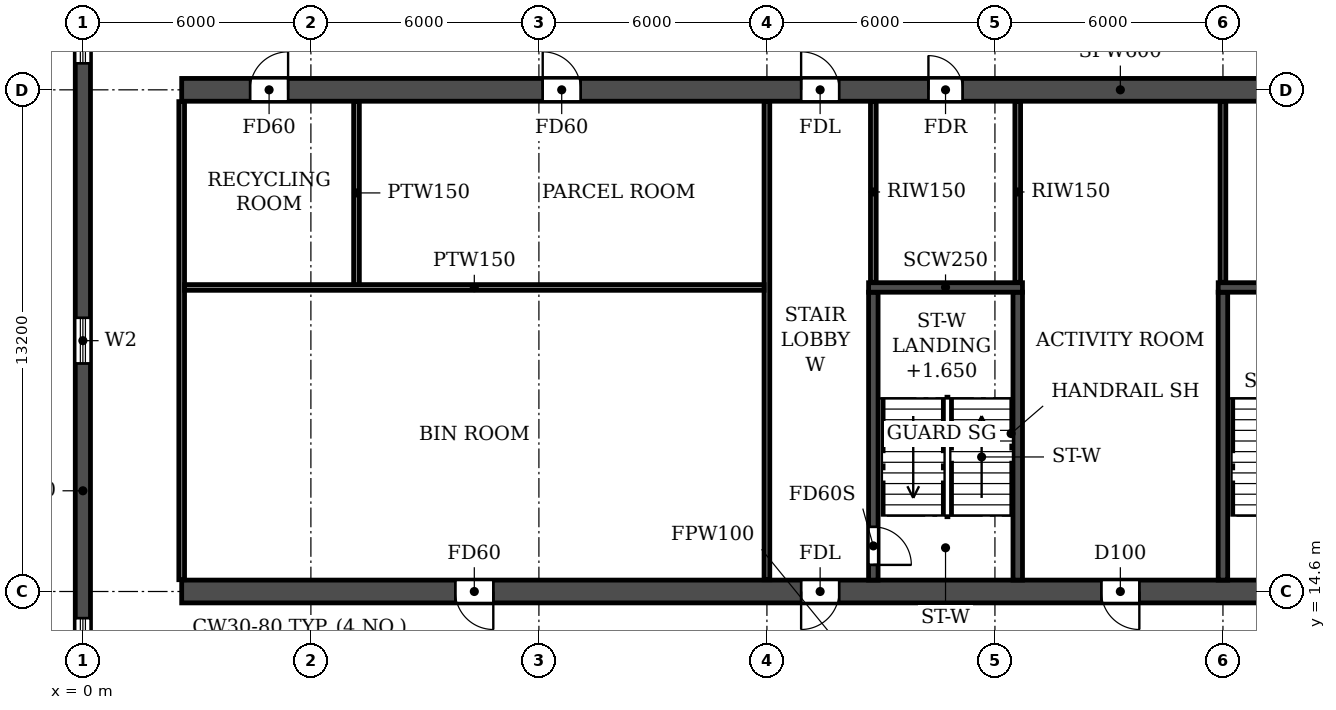
"""IFC4 building model, lengths in metres.
Left out: names, types, materials, properties, quantities, classifications, styles, units other than length and angle.
Written with IfcOpenShell. Run it as: python <this file> out.ifc"""

import sys

from ifc_helpers import new_model, si_unit, direction, frame, frame_2d, origin, place, context, subcontext, project, spatial, rectangle, extrude, element, fill, save


model = new_model("IFC4")
c1 = context("Model", 3, precision=1e-05, world=origin(), true_north=direction((0.0, 1.0)))
c2 = subcontext(c1, "Body", "Model", "MODEL_VIEW")
j1 = project(units=[si_unit("LENGTHUNIT", "METRE"), si_unit("PLANEANGLEUNIT", "RADIAN")], contexts=[c1])
p1 = place(None, origin())
s1 = spatial("IfcSite", under=j1, at=p1, CompositionType="ELEMENT")
p2 = place(p1, origin())
s2 = spatial("IfcBuilding", under=s1, at=p2, CompositionType="ELEMENT")
p3 = place(p2, frame((0.0, 0.0, 26.7)))
s3 = spatial("IfcBuildingStorey", under=s2, at=p3, CompositionType="ELEMENT", Elevation=26.7)
p4 = place(p3, frame((0.0, 4.683, 0.0), z_axis=(0.0, 0.0, 1.0), x_axis=(0.0, 1.0, 0.0)))
e1 = element("IfcWall", 1, at=p4, inside=s3, PredefinedType="SHEAR", context=c2, shape_type="SweptSolid", body=[
    extrude(rectangle(XDim=35.434, YDim=0.4, at=frame_2d((17.717, 0.0))), origin(), (0.0, 0.0, 1.0), 3.05),
])
p5 = place(p4, frame((23.817, 0.0, 0.9)))
e2 = element("IfcOpeningElement", 2, at=p5, cuts=e1, PredefinedType="OPENING", context=c2, shape_type="SweptSolid", body=[
    extrude(rectangle(XDim=1.2, YDim=1.5, at=frame_2d((0.6, 0.75))), frame((0.0, 0.21, 0.0), z_axis=(0.0, -1.0, 0.0), x_axis=(1.0, 0.0, 0.0)), (0.0, 0.0, 1.0), 0.42),
])
p6 = place(p4, frame((8.017, 0.0, 0.9)))
e3 = element("IfcOpeningElement", 3, at=p6, cuts=e1, PredefinedType="OPENING", context=c2, shape_type="SweptSolid", body=[
    extrude(rectangle(XDim=1.2, YDim=1.5, at=frame_2d((0.6, 0.75))), frame((0.0, 0.21, 0.0), z_axis=(0.0, -1.0, 0.0), x_axis=(1.0, 0.0, 0.0)), (0.0, 0.0, 1.0), 0.42),
])
p7 = place(p4, frame((15.917, 0.0, 0.9)))
e4 = element("IfcOpeningElement", 4, at=p7, cuts=e1, PredefinedType="OPENING", context=c2, shape_type="SweptSolid", body=[
    extrude(rectangle(XDim=1.2, YDim=1.5, at=frame_2d((0.6, 0.75))), frame((0.0, 0.21, 0.0), z_axis=(0.0, -1.0, 0.0), x_axis=(1.0, 0.0, 0.0)), (0.0, 0.0, 1.0), 0.42),
])
p8 = place(p4, frame((29.493, 0.0, 0.6)))
e5 = element("IfcOpeningElement", 5, at=p8, cuts=e1, PredefinedType="OPENING", context=c2, shape_type="SweptSolid", body=[
    extrude(rectangle(XDim=2.2, YDim=1.8, at=frame_2d((1.1, 0.9))), frame((0.0, 0.21, 0.0), z_axis=(0.0, -1.0, 0.0), x_axis=(1.0, 0.0, 0.0)), (0.0, 0.0, 1.0), 0.42),
])
p9 = place(p4, frame((2.541, 0.0, 0.6)))
e6 = element("IfcOpeningElement", 6, at=p9, cuts=e1, PredefinedType="OPENING", context=c2, shape_type="SweptSolid", body=[
    extrude(rectangle(XDim=2.2, YDim=1.8, at=frame_2d((1.1, 0.9))), frame((0.0, 0.21, 0.0), z_axis=(0.0, -1.0, 0.0), x_axis=(1.0, 0.0, 0.0)), (0.0, 0.0, 1.0), 0.42),
])
p10 = place(p3, frame((2.6, 14.6, 0.0), z_axis=(0.0, 0.0, 1.0), x_axis=(1.0, 0.0, 0.0)))
e7 = element("IfcWall", 7, at=p10, inside=s3, PredefinedType="SOLIDWALL", context=c2, shape_type="SweptSolid", body=[
    extrude(rectangle(XDim=96.8, YDim=0.6, at=frame_2d((48.4, 0.0))), origin(), (0.0, 0.0, 1.0), 3.05),
])
p11 = place(p10, frame((7.2, 0.0, 0.0)))
e8 = element("IfcOpeningElement", 8, at=p11, cuts=e7, PredefinedType="OPENING", context=c2, shape_type="SweptSolid", body=[
    extrude(rectangle(XDim=1.0, YDim=2.1, at=frame_2d((0.5, 1.05))), frame((0.0, 0.31, 0.0), z_axis=(0.0, -1.0, 0.0), x_axis=(1.0, 0.0, 0.0)), (0.0, 0.0, 1.0), 0.62),
])
p12 = place(p10, frame((16.3, 0.0, 0.0)))
e9 = element("IfcOpeningElement", 9, at=p12, cuts=e7, PredefinedType="OPENING", context=c2, shape_type="SweptSolid", body=[
    extrude(rectangle(XDim=1.0, YDim=2.1, at=frame_2d((0.5, 1.05))), frame((0.0, 0.31, 0.0), z_axis=(0.0, -1.0, 0.0), x_axis=(1.0, 0.0, 0.0)), (0.0, 0.0, 1.0), 0.62),
])
p13 = place(p10, frame((24.2, 0.0, 0.0)))
e10 = element("IfcOpeningElement", 10, at=p13, cuts=e7, PredefinedType="OPENING", context=c2, shape_type="SweptSolid", body=[
    extrude(rectangle(XDim=1.0, YDim=2.1, at=frame_2d((0.5, 1.05))), frame((0.0, 0.31, 0.0), z_axis=(0.0, -1.0, 0.0), x_axis=(1.0, 0.0, 0.0)), (0.0, 0.0, 1.0), 0.62),
])
p14 = place(p10, frame((28.8, 0.0, 0.0)))
e11 = element("IfcOpeningElement", 11, at=p14, cuts=e7, PredefinedType="OPENING", context=c2, shape_type="SweptSolid", body=[
    extrude(rectangle(XDim=1.0, YDim=2.1, at=frame_2d((0.5, 1.05))), frame((0.0, 0.31, 0.0), z_axis=(0.0, -1.0, 0.0), x_axis=(1.0, 0.0, 0.0)), (0.0, 0.0, 1.0), 0.62),
])
p15 = place(p10, frame((40.1, 0.0, 0.0)))
e12 = element("IfcOpeningElement", 12, at=p15, cuts=e7, PredefinedType="OPENING", context=c2, shape_type="SweptSolid", body=[
    extrude(rectangle(XDim=1.0, YDim=2.1, at=frame_2d((0.5, 1.05))), frame((0.0, 0.31, 0.0), z_axis=(0.0, -1.0, 0.0), x_axis=(1.0, 0.0, 0.0)), (0.0, 0.0, 1.0), 0.62),
])
p16 = place(p10, frame((44.0, 0.0, 0.0)))
e13 = element("IfcOpeningElement", 13, at=p16, cuts=e7, PredefinedType="OPENING", context=c2, shape_type="SweptSolid", body=[
    extrude(rectangle(XDim=1.0, YDim=2.1, at=frame_2d((0.5, 1.05))), frame((0.0, 0.31, 0.0), z_axis=(0.0, -1.0, 0.0), x_axis=(1.0, 0.0, 0.0)), (0.0, 0.0, 1.0), 0.62),
])
p17 = place(p10, frame((47.9, 0.0, 0.0)))
e14 = element("IfcOpeningElement", 14, at=p17, cuts=e7, PredefinedType="OPENING", context=c2, shape_type="SweptSolid", body=[
    extrude(rectangle(XDim=1.0, YDim=2.1, at=frame_2d((0.5, 1.05))), frame((0.0, 0.31, 0.0), z_axis=(0.0, -1.0, 0.0), x_axis=(1.0, 0.0, 0.0)), (0.0, 0.0, 1.0), 0.62),
])
p18 = place(p10, frame((53.1, 0.0, 0.0)))
e15 = element("IfcOpeningElement", 15, at=p18, cuts=e7, PredefinedType="OPENING", context=c2, shape_type="SweptSolid", body=[
    extrude(rectangle(XDim=1.0, YDim=2.1, at=frame_2d((0.5, 1.05))), frame((0.0, 0.31, 0.0), z_axis=(0.0, -1.0, 0.0), x_axis=(1.0, 0.0, 0.0)), (0.0, 0.0, 1.0), 0.62),
])
p19 = place(p10, frame((67.0, 0.0, 0.0)))
e16 = element("IfcOpeningElement", 16, at=p19, cuts=e7, PredefinedType="OPENING", context=c2, shape_type="SweptSolid", body=[
    extrude(rectangle(XDim=1.0, YDim=2.1, at=frame_2d((0.5, 1.05))), frame((0.0, 0.31, 0.0), z_axis=(0.0, -1.0, 0.0), x_axis=(1.0, 0.0, 0.0)), (0.0, 0.0, 1.0), 0.62),
])
p20 = place(p10, frame((71.6, 0.0, 0.0)))
e17 = element("IfcOpeningElement", 17, at=p20, cuts=e7, PredefinedType="OPENING", context=c2, shape_type="SweptSolid", body=[
    extrude(rectangle(XDim=1.0, YDim=2.1, at=frame_2d((0.5, 1.05))), frame((0.0, 0.31, 0.0), z_axis=(0.0, -1.0, 0.0), x_axis=(1.0, 0.0, 0.0)), (0.0, 0.0, 1.0), 0.62),
])
p21 = place(p10, frame((79.5, 0.0, 0.0)))
e18 = element("IfcOpeningElement", 18, at=p21, cuts=e7, PredefinedType="OPENING", context=c2, shape_type="SweptSolid", body=[
    extrude(rectangle(XDim=1.0, YDim=2.1, at=frame_2d((0.5, 1.05))), frame((0.0, 0.31, 0.0), z_axis=(0.0, -1.0, 0.0), x_axis=(1.0, 0.0, 0.0)), (0.0, 0.0, 1.0), 0.62),
])
p22 = place(p10, frame((83.15, 0.0, 0.0)))
e19 = element("IfcOpeningElement", 19, at=p22, cuts=e7, PredefinedType="OPENING", context=c2, shape_type="SweptSolid", body=[
    extrude(rectangle(XDim=1.0, YDim=2.1, at=frame_2d((0.5, 1.05))), frame((0.0, 0.31, 0.0), z_axis=(0.0, -1.0, 0.0), x_axis=(1.0, 0.0, 0.0)), (0.0, 0.0, 1.0), 0.62),
])
p23 = place(p10, frame((90.85, 0.0, 0.0)))
e20 = element("IfcOpeningElement", 20, at=p23, cuts=e7, PredefinedType="OPENING", context=c2, shape_type="SweptSolid", body=[
    extrude(rectangle(XDim=1.0, YDim=2.1, at=frame_2d((0.5, 1.05))), frame((0.0, 0.31, 0.0), z_axis=(0.0, -1.0, 0.0), x_axis=(1.0, 0.0, 0.0)), (0.0, 0.0, 1.0), 0.62),
])
p24 = place(p3, frame((2.6, 27.8, 0.0), z_axis=(0.0, 0.0, 1.0), x_axis=(1.0, 0.0, 0.0)))
e21 = element("IfcWall", 21, at=p24, inside=s3, PredefinedType="SOLIDWALL", context=c2, shape_type="SweptSolid", body=[
    extrude(rectangle(XDim=96.8, YDim=0.6, at=frame_2d((48.4, 0.0))), origin(), (0.0, 0.0, 1.0), 3.05),
])
p25 = place(p24, frame((1.8, 0.0, 0.0)))
e22 = element("IfcOpeningElement", 22, at=p25, cuts=e21, PredefinedType="OPENING", context=c2, shape_type="SweptSolid", body=[
    extrude(rectangle(XDim=1.0, YDim=2.1, at=frame_2d((0.5, 1.05))), frame((0.0, 0.31, 0.0), z_axis=(0.0, -1.0, 0.0), x_axis=(1.0, 0.0, 0.0)), (0.0, 0.0, 1.0), 0.62),
])
p26 = place(p24, frame((9.5, 0.0, 0.0)))
e23 = element("IfcOpeningElement", 23, at=p26, cuts=e21, PredefinedType="OPENING", context=c2, shape_type="SweptSolid", body=[
    extrude(rectangle(XDim=1.0, YDim=2.1, at=frame_2d((0.5, 1.05))), frame((0.0, 0.31, 0.0), z_axis=(0.0, -1.0, 0.0), x_axis=(1.0, 0.0, 0.0)), (0.0, 0.0, 1.0), 0.62),
])
p27 = place(p24, frame((16.3, 0.0, 0.0)))
e24 = element("IfcOpeningElement", 24, at=p27, cuts=e21, PredefinedType="OPENING", context=c2, shape_type="SweptSolid", body=[
    extrude(rectangle(XDim=1.0, YDim=2.1, at=frame_2d((0.5, 1.05))), frame((0.0, 0.31, 0.0), z_axis=(0.0, -1.0, 0.0), x_axis=(1.0, 0.0, 0.0)), (0.0, 0.0, 1.0), 0.62),
])
p28 = place(p24, frame((19.65, 0.0, 0.0)))
e25 = element("IfcOpeningElement", 25, at=p28, cuts=e21, PredefinedType="OPENING", context=c2, shape_type="SweptSolid", body=[
    extrude(rectangle(XDim=0.9, YDim=2.1, at=frame_2d((0.45, 1.05))), frame((0.0, 0.31, 0.0), z_axis=(0.0, -1.0, 0.0), x_axis=(1.0, 0.0, 0.0)), (0.0, 0.0, 1.0), 0.62),
])
p29 = place(p24, frame((28.85, 0.0, 0.0)))
e26 = element("IfcOpeningElement", 26, at=p29, cuts=e21, PredefinedType="OPENING", context=c2, shape_type="SweptSolid", body=[
    extrude(rectangle(XDim=0.9, YDim=2.1, at=frame_2d((0.45, 1.05))), frame((0.0, 0.31, 0.0), z_axis=(0.0, -1.0, 0.0), x_axis=(1.0, 0.0, 0.0)), (0.0, 0.0, 1.0), 0.62),
])
p30 = place(p24, frame((32.0, 0.0, 0.0)))
e27 = element("IfcOpeningElement", 27, at=p30, cuts=e21, PredefinedType="OPENING", context=c2, shape_type="SweptSolid", body=[
    extrude(rectangle(XDim=1.0, YDim=2.1, at=frame_2d((0.5, 1.05))), frame((0.0, 0.31, 0.0), z_axis=(0.0, -1.0, 0.0), x_axis=(1.0, 0.0, 0.0)), (0.0, 0.0, 1.0), 0.62),
])
p31 = place(p24, frame((37.2, 0.0, 0.0)))
e28 = element("IfcOpeningElement", 28, at=p31, cuts=e21, PredefinedType="OPENING", context=c2, shape_type="SweptSolid", body=[
    extrude(rectangle(XDim=1.0, YDim=2.1, at=frame_2d((0.5, 1.05))), frame((0.0, 0.31, 0.0), z_axis=(0.0, -1.0, 0.0), x_axis=(1.0, 0.0, 0.0)), (0.0, 0.0, 1.0), 0.62),
])
p32 = place(p24, frame((45.0, 0.0, 0.0)))
e29 = element("IfcOpeningElement", 29, at=p32, cuts=e21, PredefinedType="OPENING", context=c2, shape_type="SweptSolid", body=[
    extrude(rectangle(XDim=1.0, YDim=2.1, at=frame_2d((0.5, 1.05))), frame((0.0, 0.31, 0.0), z_axis=(0.0, -1.0, 0.0), x_axis=(1.0, 0.0, 0.0)), (0.0, 0.0, 1.0), 0.62),
])
p33 = place(p24, frame((47.9, 0.0, 0.0)))
e30 = element("IfcOpeningElement", 30, at=p33, cuts=e21, PredefinedType="OPENING", context=c2, shape_type="SweptSolid", body=[
    extrude(rectangle(XDim=1.0, YDim=2.1, at=frame_2d((0.5, 1.05))), frame((0.0, 0.31, 0.0), z_axis=(0.0, -1.0, 0.0), x_axis=(1.0, 0.0, 0.0)), (0.0, 0.0, 1.0), 0.62),
])
p34 = place(p24, frame((52.1, 0.0, 0.0)))
e31 = element("IfcOpeningElement", 31, at=p34, cuts=e21, PredefinedType="OPENING", context=c2, shape_type="SweptSolid", body=[
    extrude(rectangle(XDim=1.0, YDim=2.1, at=frame_2d((0.5, 1.05))), frame((0.0, 0.31, 0.0), z_axis=(0.0, -1.0, 0.0), x_axis=(1.0, 0.0, 0.0)), (0.0, 0.0, 1.0), 0.62),
])
p35 = place(p24, frame((56.0, 0.0, 0.0)))
e32 = element("IfcOpeningElement", 32, at=p35, cuts=e21, PredefinedType="OPENING", context=c2, shape_type="SweptSolid", body=[
    extrude(rectangle(XDim=1.0, YDim=2.1, at=frame_2d((0.5, 1.05))), frame((0.0, 0.31, 0.0), z_axis=(0.0, -1.0, 0.0), x_axis=(1.0, 0.0, 0.0)), (0.0, 0.0, 1.0), 0.62),
])
p36 = place(p24, frame((58.6, 0.0, 0.0)))
e33 = element("IfcOpeningElement", 33, at=p36, cuts=e21, PredefinedType="OPENING", context=c2, shape_type="SweptSolid", body=[
    extrude(rectangle(XDim=1.0, YDim=2.1, at=frame_2d((0.5, 1.05))), frame((0.0, 0.31, 0.0), z_axis=(0.0, -1.0, 0.0), x_axis=(1.0, 0.0, 0.0)), (0.0, 0.0, 1.0), 0.62),
])
p37 = place(p24, frame((62.25, 0.0, 0.0)))
e34 = element("IfcOpeningElement", 34, at=p37, cuts=e21, PredefinedType="OPENING", context=c2, shape_type="SweptSolid", body=[
    extrude(rectangle(XDim=1.5, YDim=2.1, at=frame_2d((0.75, 1.05))), frame((0.0, 0.31, 0.0), z_axis=(0.0, -1.0, 0.0), x_axis=(1.0, 0.0, 0.0)), (0.0, 0.0, 1.0), 0.62),
])
p38 = place(p24, frame((67.05, 0.0, 0.0)))
e35 = element("IfcOpeningElement", 35, at=p38, cuts=e21, PredefinedType="OPENING", context=c2, shape_type="SweptSolid", body=[
    extrude(rectangle(XDim=0.9, YDim=2.1, at=frame_2d((0.45, 1.05))), frame((0.0, 0.31, 0.0), z_axis=(0.0, -1.0, 0.0), x_axis=(1.0, 0.0, 0.0)), (0.0, 0.0, 1.0), 0.62),
])
p39 = place(p24, frame((76.25, 0.0, 0.0)))
e36 = element("IfcOpeningElement", 36, at=p39, cuts=e21, PredefinedType="OPENING", context=c2, shape_type="SweptSolid", body=[
    extrude(rectangle(XDim=0.9, YDim=2.1, at=frame_2d((0.45, 1.05))), frame((0.0, 0.31, 0.0), z_axis=(0.0, -1.0, 0.0), x_axis=(1.0, 0.0, 0.0)), (0.0, 0.0, 1.0), 0.62),
])
p40 = place(p24, frame((79.5, 0.0, 0.0)))
e37 = element("IfcOpeningElement", 37, at=p40, cuts=e21, PredefinedType="OPENING", context=c2, shape_type="SweptSolid", body=[
    extrude(rectangle(XDim=1.0, YDim=2.1, at=frame_2d((0.5, 1.05))), frame((0.0, 0.31, 0.0), z_axis=(0.0, -1.0, 0.0), x_axis=(1.0, 0.0, 0.0)), (0.0, 0.0, 1.0), 0.62),
])
p41 = place(p24, frame((88.6, 0.0, 0.0)))
e38 = element("IfcOpeningElement", 38, at=p41, cuts=e21, PredefinedType="OPENING", context=c2, shape_type="SweptSolid", body=[
    extrude(rectangle(XDim=1.0, YDim=2.1, at=frame_2d((0.5, 1.05))), frame((0.0, 0.31, 0.0), z_axis=(0.0, -1.0, 0.0), x_axis=(1.0, 0.0, 0.0)), (0.0, 0.0, 1.0), 0.62),
])
p42 = place(p3, frame((30.0, 14.9, 0.0), z_axis=(0.0, 0.0, 1.0), x_axis=(0.0, 1.0, 0.0)))
e39 = element("IfcWall", 39, at=p42, inside=s3, PredefinedType="SOLIDWALL", context=c2, shape_type="SweptSolid", body=[
    extrude(rectangle(XDim=7.575, YDim=0.25, at=frame_2d((3.788, 0.0))), origin(), (0.0, 0.0, 1.0), 3.05),
])
p43 = place(p3, frame((29.875, 22.6, 0.0), z_axis=(0.0, 0.0, 1.0), x_axis=(1.0, 0.0, 0.0)))
e40 = element("IfcWall", 40, at=p43, inside=s3, PredefinedType="SOLIDWALL", context=c2, shape_type="SweptSolid", body=[
    extrude(rectangle(XDim=4.05, YDim=0.25, at=frame_2d((2.025, 0.0))), origin(), (0.0, 0.0, 1.0), 3.05),
])
p44 = place(p3, frame((20.8, 14.9, 0.0), z_axis=(0.0, 0.0, 1.0), x_axis=(0.0, 1.0, 0.0)))
e41 = element("IfcWall", 41, at=p44, inside=s3, PredefinedType="SOLIDWALL", context=c2, shape_type="SweptSolid", body=[
    extrude(rectangle(XDim=7.575, YDim=0.25, at=frame_2d((3.788, 0.0))), origin(), (0.0, 0.0, 1.0), 3.05),
])
p45 = place(p44, frame((0.4, 0.0, 0.0)))
e42 = element("IfcOpeningElement", 42, at=p45, cuts=e41, PredefinedType="OPENING", context=c2, shape_type="SweptSolid", body=[
    extrude(rectangle(XDim=1.0, YDim=2.1, at=frame_2d((0.5, 1.05))), frame((0.0, 0.135, 0.0), z_axis=(0.0, -1.0, 0.0), x_axis=(1.0, 0.0, 0.0)), (0.0, 0.0, 1.0), 0.27),
])
p46 = place(p3, frame((24.6, 14.9, 0.0), z_axis=(0.0, 0.0, 1.0), x_axis=(0.0, 1.0, 0.0)))
e43 = element("IfcWall", 43, at=p46, inside=s3, PredefinedType="SOLIDWALL", context=c2, shape_type="SweptSolid", body=[
    extrude(rectangle(XDim=7.575, YDim=0.25, at=frame_2d((3.788, 0.0))), origin(), (0.0, 0.0, 1.0), 3.05),
])
p47 = place(p3, frame((20.675, 22.6, 0.0), z_axis=(0.0, 0.0, 1.0), x_axis=(1.0, 0.0, 0.0)))
e44 = element("IfcWall", 44, at=p47, inside=s3, PredefinedType="SOLIDWALL", context=c2, shape_type="SweptSolid", body=[
    extrude(rectangle(XDim=4.05, YDim=0.25, at=frame_2d((2.025, 0.0))), origin(), (0.0, 0.0, 1.0), 3.05),
])
for number, where, z_axis, x_axis in (
    (45, (2.6, 14.91, 0.0), (0.0, 0.0, 1.0), (0.0, 1.0, 0.0)),
    (46, (18.0, 14.91, 0.0), (0.0, 0.0, 1.0), (0.0, 1.0, 0.0)),
):
    element("IfcWall", number, at=place(p3, frame(where, z_axis=z_axis, x_axis=x_axis)), inside=s3, PredefinedType="PARTITIONING", context=c2, shape_type="SweptSolid", body=[
        extrude(rectangle(XDim=12.58, YDim=0.15, at=frame_2d((6.29, 0.0))), origin(), (0.0, 0.0, 1.0), 3.05),
    ])
p48 = place(p3, frame((2.675, 22.6, 0.0), z_axis=(0.0, 0.0, 1.0), x_axis=(1.0, 0.0, 0.0)))
e47 = element("IfcWall", 47, at=p48, inside=s3, PredefinedType="PARTITIONING", context=c2, shape_type="SweptSolid", body=[
    extrude(rectangle(XDim=15.25, YDim=0.15, at=frame_2d((7.625, 0.0))), origin(), (0.0, 0.0, 1.0), 3.05),
])
p49 = place(p3, frame((7.2, 22.675, 0.0), z_axis=(0.0, 0.0, 1.0), x_axis=(0.0, 1.0, 0.0)))
e48 = element("IfcWall", 48, at=p49, inside=s3, PredefinedType="PARTITIONING", context=c2, shape_type="SweptSolid", body=[
    extrude(rectangle(XDim=4.815, YDim=0.15, at=frame_2d((2.407, 0.0))), origin(), (0.0, 0.0, 1.0), 3.05),
])
for number, where, z_axis, x_axis in (
    (49, (20.8, 22.735, 0.0), (0.0, 0.0, 1.0), (0.0, 1.0, 0.0)),
    (50, (24.6, 22.735, 0.0), (0.0, 0.0, 1.0), (0.0, 1.0, 0.0)),
    (51, (30.0, 22.735, 0.0), (0.0, 0.0, 1.0), (0.0, 1.0, 0.0)),
):
    element("IfcWall", number, at=place(p3, frame(where, z_axis=z_axis, x_axis=x_axis)), inside=s3, PredefinedType="PARTITIONING", context=c2, shape_type="SweptSolid", body=[
        extrude(rectangle(XDim=4.755, YDim=0.15, at=frame_2d((2.377, 0.0))), origin(), (0.0, 0.0, 1.0), 3.05),
    ])
p50 = place(p5, origin())
e52 = element("IfcWindow", 52, at=p50, inside=s3, PartitioningType="SINGLE_PANEL", PredefinedType="WINDOW", context=c2, shape_type="SweptSolid", body=[
    extrude(rectangle(XDim=1.2, YDim=1.5, at=frame_2d((0.6, 0.75))), frame((0.0, 0.03, 0.0), z_axis=(0.0, -1.0, 0.0), x_axis=(1.0, 0.0, 0.0)), (0.0, 0.0, 1.0), 0.06),
])
fill(e2, e52)
p51 = place(p6, origin())
e53 = element("IfcWindow", 53, at=p51, inside=s3, PartitioningType="SINGLE_PANEL", PredefinedType="WINDOW", context=c2, shape_type="SweptSolid", body=[
    extrude(rectangle(XDim=1.2, YDim=1.5, at=frame_2d((0.6, 0.75))), frame((0.0, 0.03, 0.0), z_axis=(0.0, -1.0, 0.0), x_axis=(1.0, 0.0, 0.0)), (0.0, 0.0, 1.0), 0.06),
])
fill(e3, e53)
p52 = place(p7, origin())
e54 = element("IfcWindow", 54, at=p52, inside=s3, PartitioningType="SINGLE_PANEL", PredefinedType="WINDOW", context=c2, shape_type="SweptSolid", body=[
    extrude(rectangle(XDim=1.2, YDim=1.5, at=frame_2d((0.6, 0.75))), frame((0.0, 0.03, 0.0), z_axis=(0.0, -1.0, 0.0), x_axis=(1.0, 0.0, 0.0)), (0.0, 0.0, 1.0), 0.06),
])
fill(e4, e54)
p53 = place(p25, origin())
e55 = element("IfcDoor", 55, at=p53, inside=s3, OperationType="SINGLE_SWING_RIGHT", PredefinedType="DOOR", context=c2, shape_type="SweptSolid", body=[
    extrude(rectangle(XDim=1.0, YDim=2.1, at=frame_2d((0.5, 1.05))), frame((0.0, 0.025, 0.0), z_axis=(0.0, -1.0, 0.0), x_axis=(1.0, 0.0, 0.0)), (0.0, 0.0, 1.0), 0.05),
])
fill(e22, e55)
p54 = place(p26, origin())
e56 = element("IfcDoor", 56, at=p54, inside=s3, OperationType="SINGLE_SWING_LEFT", PredefinedType="DOOR", context=c2, shape_type="SweptSolid", body=[
    extrude(rectangle(XDim=1.0, YDim=2.1, at=frame_2d((0.5, 1.05))), frame((0.0, 0.025, 0.0), z_axis=(0.0, -1.0, 0.0), x_axis=(1.0, 0.0, 0.0)), (0.0, 0.0, 1.0), 0.05),
])
fill(e23, e56)
p55 = place(p27, origin())
e57 = element("IfcDoor", 57, at=p55, inside=s3, OperationType="SINGLE_SWING_LEFT", PredefinedType="DOOR", context=c2, shape_type="SweptSolid", body=[
    extrude(rectangle(XDim=1.0, YDim=2.1, at=frame_2d((0.5, 1.05))), frame((0.0, 0.025, 0.0), z_axis=(0.0, -1.0, 0.0), x_axis=(1.0, 0.0, 0.0)), (0.0, 0.0, 1.0), 0.05),
])
fill(e24, e57)
p56 = place(p28, origin())
e58 = element("IfcDoor", 58, at=p56, inside=s3, OperationType="SINGLE_SWING_LEFT", PredefinedType="DOOR", context=c2, shape_type="SweptSolid", body=[
    extrude(rectangle(XDim=0.9, YDim=2.1, at=frame_2d((0.45, 1.05))), frame((0.0, 0.025, 0.0), z_axis=(0.0, -1.0, 0.0), x_axis=(1.0, 0.0, 0.0)), (0.0, 0.0, 1.0), 0.05),
])
fill(e25, e58)
p57 = place(p11, frame((1.0, 0.0, 0.0), z_axis=(0.0, 0.0, 1.0), x_axis=(-1.0, 0.0, 0.0)))
e59 = element("IfcDoor", 59, at=p57, inside=s3, OperationType="SINGLE_SWING_LEFT", PredefinedType="DOOR", context=c2, shape_type="SweptSolid", body=[
    extrude(rectangle(XDim=1.0, YDim=2.1, at=frame_2d((0.5, 1.05))), frame((0.0, 0.025, 0.0), z_axis=(0.0, -1.0, 0.0), x_axis=(1.0, 0.0, 0.0)), (0.0, 0.0, 1.0), 0.05),
])
fill(e8, e59)
p58 = place(p12, frame((1.0, 0.0, 0.0), z_axis=(0.0, 0.0, 1.0), x_axis=(-1.0, 0.0, 0.0)))
e60 = element("IfcDoor", 60, at=p58, inside=s3, OperationType="SINGLE_SWING_RIGHT", PredefinedType="DOOR", context=c2, shape_type="SweptSolid", body=[
    extrude(rectangle(XDim=1.0, YDim=2.1, at=frame_2d((0.5, 1.05))), frame((0.0, 0.025, 0.0), z_axis=(0.0, -1.0, 0.0), x_axis=(1.0, 0.0, 0.0)), (0.0, 0.0, 1.0), 0.05),
])
fill(e9, e60)
p59 = place(p13, frame((1.0, 0.0, 0.0), z_axis=(0.0, 0.0, 1.0), x_axis=(-1.0, 0.0, 0.0)))
e61 = element("IfcDoor", 61, at=p59, inside=s3, OperationType="SINGLE_SWING_LEFT", PredefinedType="DOOR", context=c2, shape_type="SweptSolid", body=[
    extrude(rectangle(XDim=1.0, YDim=2.1, at=frame_2d((0.5, 1.05))), frame((0.0, 0.025, 0.0), z_axis=(0.0, -1.0, 0.0), x_axis=(1.0, 0.0, 0.0)), (0.0, 0.0, 1.0), 0.05),
])
fill(e10, e61)
p60 = place(p45, frame((1.0, 0.0, 0.0), z_axis=(0.0, 0.0, 1.0), x_axis=(-1.0, 0.0, 0.0)))
e62 = element("IfcDoor", 62, at=p60, inside=s3, OperationType="SINGLE_SWING_RIGHT", PredefinedType="DOOR", context=c2, shape_type="SweptSolid", body=[
    extrude(rectangle(XDim=1.0, YDim=2.1, at=frame_2d((0.5, 1.05))), frame((0.0, 0.025, 0.0), z_axis=(0.0, -1.0, 0.0), x_axis=(1.0, 0.0, 0.0)), (0.0, 0.0, 1.0), 0.05),
])
fill(e42, e62)
save(model, sys.argv[1])
